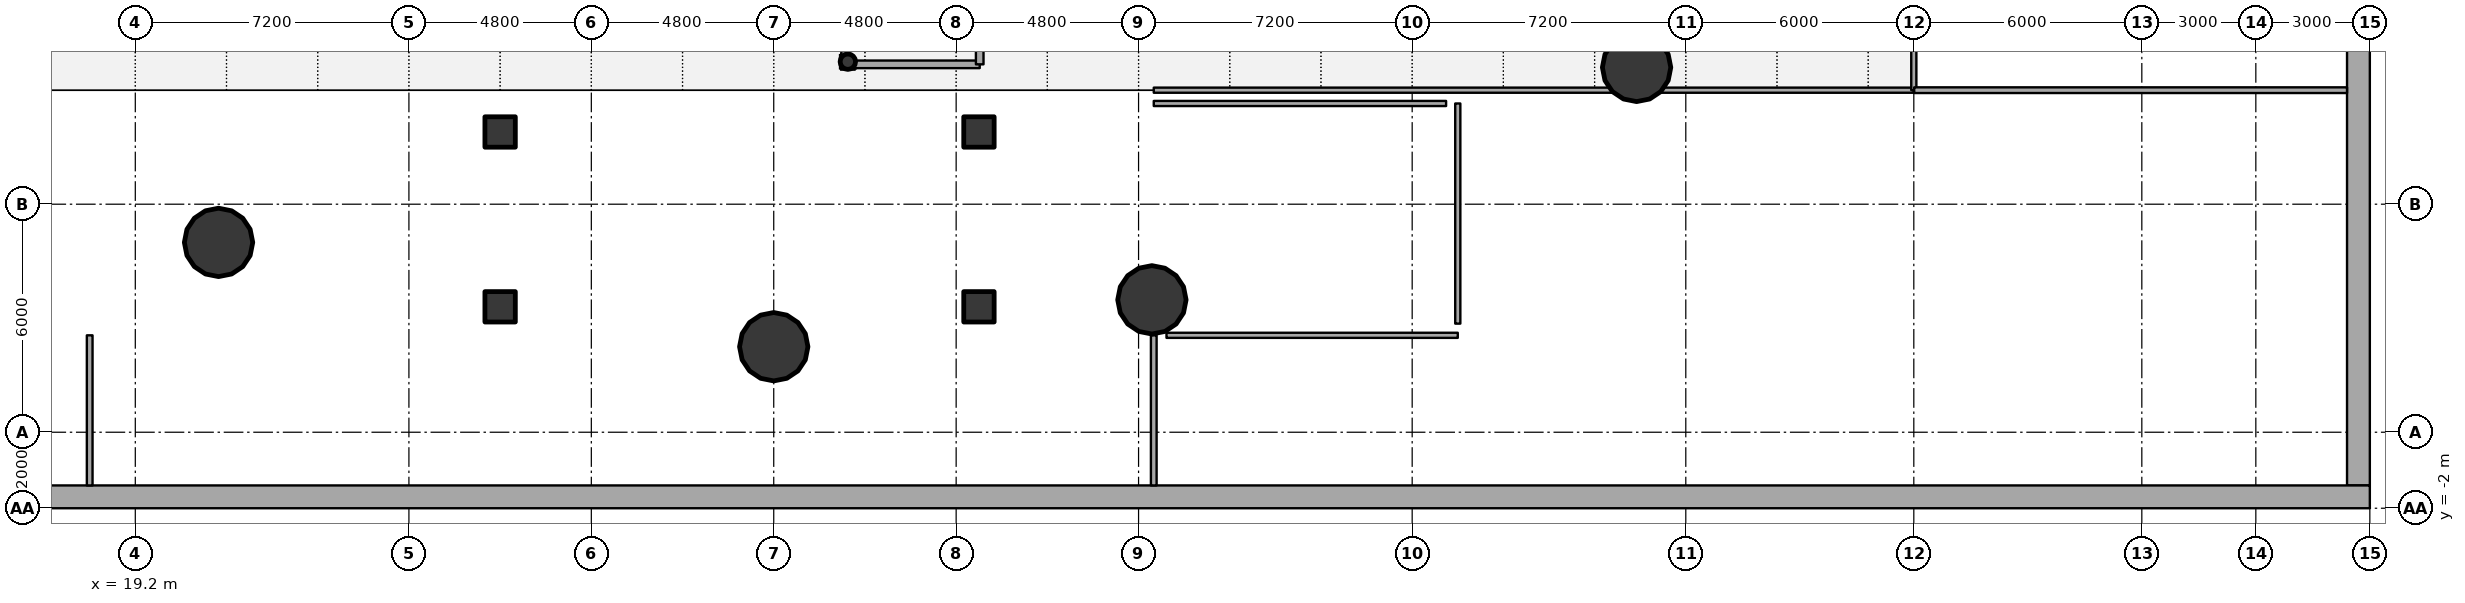
"""IFC4 building model, lengths in metres.
Left out: names, types, materials, properties, quantities, classifications, styles, units other than length and angle.
Written with IfcOpenShell. Run it as: python <this file> out.ifc"""

import sys

from ifc_helpers import new_model, si_unit, direction, frame, frame_2d, origin, origin_2d, place, context, subcontext, project, spatial, rectangle, hollow_circle, extrude, source, transform, mapped, element, fill, save


model = new_model("IFC4")
c1 = context("Model", 3, precision=1e-05, world=origin(), true_north=direction((0.0, 1.0)))
c2 = subcontext(c1, "Body", "Model", "MODEL_VIEW")
j1 = project(units=[si_unit("LENGTHUNIT", "METRE"), si_unit("PLANEANGLEUNIT", "RADIAN")], contexts=[c1])
p1 = place(None, origin())
s1 = spatial("IfcSite", under=j1, at=p1, CompositionType="ELEMENT")
p2 = place(p1, origin())
s2 = spatial("IfcBuilding", under=s1, at=p2, CompositionType="ELEMENT")
p3 = place(p2, frame((0.0, 0.0, -9.0)))
s3 = spatial("IfcBuildingStorey", under=s2, at=p3, CompositionType="ELEMENT", Elevation=-9.0)
for number, where, z_axis, x_axis in (
    (1, (41.4, 3.3, 0.0), (0.0, 0.0, 1.0), (1.0, 0.0, 0.0)),
    (2, (41.4, 7.9, 0.0), (0.0, 0.0, 1.0), (1.0, 0.0, 0.0)),
):
    element("IfcColumn", number, at=place(p3, frame(where, z_axis=z_axis, x_axis=x_axis)), inside=s3, PredefinedType="COLUMN", context=c2, shape_type="SweptSolid", body=[
        extrude(rectangle(XDim=0.8, YDim=0.8, at=origin_2d()), origin(), (0.0, 0.0, 1.0), 1.525),
    ])
for number, where, z_axis, x_axis in (
    (3, (28.8, 3.3, 0.0), (0.0, 0.0, 1.0), (1.0, 0.0, 0.0)),
    (4, (28.8, 7.9, 0.0), (0.0, 0.0, 1.0), (1.0, 0.0, 0.0)),
):
    element("IfcColumn", number, at=place(p3, frame(where, z_axis=z_axis, x_axis=x_axis)), inside=s3, PredefinedType="COLUMN", context=c2, shape_type="SweptSolid", body=[
        extrude(rectangle(XDim=0.8, YDim=0.8, at=origin_2d()), origin(), (0.0, 0.0, 1.0), 3.1),
    ])
p4 = place(p3, frame((77.7, 55.4, 0.0), z_axis=(0.0, 0.0, 1.0), x_axis=(0.0, -1.0, 0.0)))
e5 = element("IfcWall", 5, at=p4, inside=s3, PredefinedType="SHEAR", context=c2, shape_type="SweptSolid", body=[
    extrude(rectangle(XDim=56.8, YDim=0.6, at=frame_2d((28.4, 0.0))), origin(), (0.0, 0.0, 1.0), 4.2),
])
p5 = place(p3, frame((78.0, -1.7, 0.0), z_axis=(0.0, 0.0, 1.0), x_axis=(-1.0, 0.0, 0.0)))
e6 = element("IfcWall", 6, at=p5, inside=s3, PredefinedType="SHEAR", context=c2, shape_type="SweptSolid", body=[
    extrude(rectangle(XDim=84.0, YDim=0.6, at=frame_2d((42.0, 0.0))), origin(), (0.0, 0.0, 1.0), 4.2),
])
p6 = place(p3, frame((37.95, 9.75, 0.0), z_axis=(0.0, 0.0, 1.0), x_axis=(1.0, 0.0, 0.0)))
e7 = element("IfcColumn", 7, at=p6, inside=s3, PredefinedType="COLUMN", context=c2, shape_type="SweptSolid", body=[
    extrude(hollow_circle(Radius=0.203, WallThickness=0.016, at=origin_2d()), origin(), (0.0, 0.0, 1.0), 4.5),
])
for number, where, z_axis, x_axis in (
    (8, (21.391, 4.995, 0.0), (0.0, 0.0, 1.0), (1.0, 0.0, 0.0)),
    (9, (36.0, 2.25, 0.0), (0.0, 0.0, 1.0), (1.0, 0.0, 0.0)),
    (10, (45.951, 3.484, 0.0), (0.0, 0.0, 1.0), (1.0, 0.0, 0.0)),
    (11, (58.705, 9.599, 0.0), (0.0, 0.0, 1.0), (1.0, 0.0, 0.0)),
):
    element("IfcColumn", number, at=place(p3, frame(where, z_axis=z_axis, x_axis=x_axis)), inside=s3, PredefinedType="COLUMN", context=c2, shape_type="SweptSolid", body=[
        extrude(hollow_circle(Radius=0.9, WallThickness=0.05, at=origin_2d()), origin(), (0.0, 0.0, 1.0), 4.5),
    ])
p7 = place(p3, frame((18.0, -1.4, 0.0), z_axis=(0.0, 0.0, 1.0), x_axis=(0.0, 1.0, 0.0)))
e12 = element("IfcWall", 12, at=p7, inside=s3, PredefinedType="PARTITIONING", context=c2, shape_type="SweptSolid", body=[
    extrude(rectangle(XDim=3.95, YDim=0.15, at=frame_2d((1.975, 0.0))), origin(), (0.0, 0.0, 1.0), 3.385),
])
p8 = place(p7, frame((1.425, 0.0, 0.0)))
e13 = element("IfcOpeningElement", 13, at=p8, cuts=e12, PredefinedType="OPENING", context=c2, shape_type="SweptSolid", body=[
    extrude(rectangle(XDim=1.1, YDim=2.15, at=origin_2d()), frame((0.55, 0.085, 1.075), z_axis=(0.0, -1.0, 0.0), x_axis=(1.0, 0.0, 0.0)), (0.0, 0.0, 1.0), 0.17),
])
p9 = place(p3, frame((37.88, 9.68, 0.0), z_axis=(0.0, 0.0, 1.0), x_axis=(0.0, 1.0, 0.0)))
e14 = element("IfcWall", 14, at=p9, inside=s3, PredefinedType="PARTITIONING", context=c2, shape_type="SweptSolid", body=[
    extrude(rectangle(XDim=7.92, YDim=0.2, at=frame_2d((3.96, 0.0))), origin(), (0.0, 0.0, 1.0), 4.2),
])
p10 = place(p3, frame((37.88, 9.68, 0.0), z_axis=(0.0, 0.0, 1.0), x_axis=(1.0, 0.0, 0.0)))
e15 = element("IfcWall", 15, at=p10, inside=s3, PredefinedType="PARTITIONING", context=c2, shape_type="SweptSolid", body=[
    extrude(rectangle(XDim=3.54, YDim=0.2, at=frame_2d((1.77, 0.0))), origin(), (0.0, 0.0, 1.0), 4.2),
])
p11 = place(p3, frame((41.42, 9.68, 0.0), z_axis=(0.0, 0.0, 1.0), x_axis=(0.0, 1.0, 0.0)))
e16 = element("IfcWall", 16, at=p11, inside=s3, PredefinedType="PARTITIONING", context=c2, shape_type="SweptSolid", body=[
    extrude(rectangle(XDim=7.92, YDim=0.2, at=frame_2d((3.96, 0.0))), origin(), (0.0, 0.0, 1.0), 3.385),
])
p12 = place(p3, frame((46.0, -1.4, 0.0), z_axis=(0.0, 0.0, 1.0), x_axis=(0.0, 1.0, 0.0)))
e17 = element("IfcWall", 17, at=p12, inside=s3, PredefinedType="PARTITIONING", context=c2, shape_type="SweptSolid", body=[
    extrude(rectangle(XDim=3.95, YDim=0.15, at=frame_2d((1.975, 0.0))), origin(), (0.0, 0.0, 1.0), 4.2),
])
p13 = place(p3, frame((46.0, 9.0, 0.0), z_axis=(0.0, 0.0, 1.0), x_axis=(1.0, 0.0, 0.0)))
e18 = element("IfcWall", 18, at=p13, inside=s3, PredefinedType="PARTITIONING", context=c2, shape_type="SweptSolid", body=[
    extrude(rectangle(XDim=20.0, YDim=0.135, at=frame_2d((10.0, 0.0))), origin(), (0.0, 0.0, 1.0), 3.385),
])
p14 = place(p13, frame((9.45, 0.0, 0.0)))
e19 = element("IfcOpeningElement", 19, at=p14, cuts=e18, PredefinedType="OPENING", context=c2, shape_type="SweptSolid", body=[
    extrude(rectangle(XDim=1.1, YDim=2.15, at=origin_2d()), frame((0.55, 0.078, 1.075), z_axis=(0.0, -1.0, 0.0), x_axis=(1.0, 0.0, 0.0)), (0.0, 0.0, 1.0), 0.155),
])
p15 = place(p3, frame((66.0, 9.0, 0.0), z_axis=(0.0, 0.0, 1.0), x_axis=(0.0, 1.0, 0.0)))
e20 = element("IfcWall", 20, at=p15, inside=s3, PredefinedType="PARTITIONING", context=c2, shape_type="SweptSolid", body=[
    extrude(rectangle(XDim=7.0, YDim=0.135, at=frame_2d((3.5, 0.0))), origin(), (0.0, 0.0, 1.0), 3.385),
])
p16 = place(p3, frame((66.01, 9.0, 0.0), z_axis=(0.0, 0.0, 1.0), x_axis=(1.0, 0.0, 0.0)))
e21 = element("IfcWall", 21, at=p16, inside=s3, PredefinedType="PARTITIONING", context=c2, shape_type="SweptSolid", body=[
    extrude(rectangle(XDim=11.39, YDim=0.15, at=frame_2d((5.695, 0.0))), origin(), (0.0, 0.0, 1.0), 4.2),
])
p17 = place(p3, frame((46.335, 2.55, 0.0), z_axis=(0.0, 0.0, 1.0), x_axis=(1.0, 0.0, 0.0)))
e22 = element("IfcWall", 22, at=p17, inside=s3, PredefinedType="PARTITIONING", context=c2, shape_type="SweptSolid", body=[
    extrude(rectangle(XDim=7.665, YDim=0.135, at=frame_2d((3.833, 0.0))), origin(), (0.0, 0.0, 1.0), 3.385),
])
p18 = place(p3, frame((54.0, 2.857, 0.0), z_axis=(0.0, 0.0, 1.0), x_axis=(0.0, 1.0, 0.0)))
e23 = element("IfcWall", 23, at=p18, inside=s3, PredefinedType="PARTITIONING", context=c2, shape_type="SweptSolid", body=[
    extrude(rectangle(XDim=5.792, YDim=0.135, at=frame_2d((2.896, 0.0))), origin(), (0.0, 0.0, 1.0), 4.2),
])
p19 = place(p3, frame((53.692, 8.65, 0.0), z_axis=(0.0, 0.0, 1.0), x_axis=(-1.0, 0.0, 0.0)))
e24 = element("IfcWall", 24, at=p19, inside=s3, PredefinedType="PARTITIONING", context=c2, shape_type="SweptSolid", body=[
    extrude(rectangle(XDim=7.692, YDim=0.135, at=frame_2d((3.846, 0.0))), origin(), (0.0, 0.0, 1.0), 4.2),
])
m1 = source(origin(), c2, "Body", "SweptSolid", [
    extrude(rectangle(XDim=1.1, YDim=2.15, at=origin_2d()), frame((0.55, 0.025, 1.075), z_axis=(0.0, -1.0, 0.0), x_axis=(1.0, 0.0, 0.0)), (0.0, 0.0, 1.0), 0.05),
])
p20 = place(p8, origin())
e25 = element("IfcDoor", 25, at=p20, inside=s3, OperationType="SINGLE_SWING_LEFT", PredefinedType="DOOR", context=c2, shape_type="MappedRepresentation", body=[
    mapped(m1, transform((0.0, 0.0, 0.0), x_axis=(1.0, 0.0, 0.0), y_axis=(0.0, 1.0, 0.0), z_axis=(0.0, 0.0, 1.0), scale=1.0)),
])
fill(e13, e25)
p21 = place(p14, origin())
e26 = element("IfcDoor", 26, at=p21, inside=s3, OperationType="SINGLE_SWING_RIGHT", PredefinedType="DOOR", context=c2, shape_type="MappedRepresentation", body=[
    mapped(m1, transform((0.0, 0.0, 0.0), x_axis=(1.0, 0.0, 0.0), y_axis=(0.0, 1.0, 0.0), z_axis=(0.0, 0.0, 1.0), scale=1.0)),
])
fill(e19, e26)
save(model, sys.argv[1])
